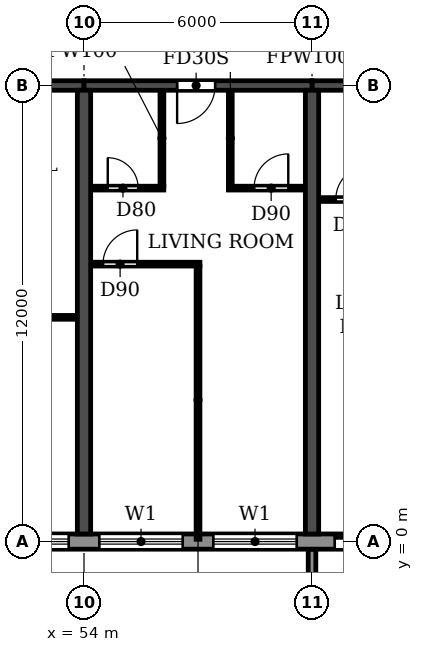
"""IFC4 building model, lengths in metres.
Left out: names, types, materials, properties, quantities, classifications, styles, units other than length and angle.
Written with IfcOpenShell. Run it as: python <this file> out.ifc"""

import sys

from ifc_helpers import new_model, si_unit, direction, frame, frame_2d, origin, place, context, subcontext, project, spatial, polyline, rectangle, outline, extrude, source, transform, mapped, element, fill, save


model = new_model("IFC4")
c1 = context("Model", 3, precision=1e-05, world=origin(), true_north=direction((0.0, 1.0)))
c2 = subcontext(c1, "Body", "Model", "MODEL_VIEW")
j1 = project(units=[si_unit("LENGTHUNIT", "METRE"), si_unit("PLANEANGLEUNIT", "RADIAN")], contexts=[c1])
p1 = place(None, origin())
s1 = spatial("IfcSite", under=j1, at=p1, CompositionType="ELEMENT")
p2 = place(p1, origin())
s2 = spatial("IfcBuilding", under=s1, at=p2, CompositionType="ELEMENT")
p3 = place(p2, frame((0.0, 0.0, 102.6)))
s3 = spatial("IfcBuildingStorey", under=s2, at=p3, CompositionType="ELEMENT", Elevation=102.6)
for number, where, z_axis, x_axis in (
    (1, (54.0, 0.2, 0.0), (0.0, 0.0, 1.0), (0.0, 1.0, 0.0)),
    (2, (60.0, 0.2, 0.0), (0.0, 0.0, 1.0), (0.0, 1.0, 0.0)),
):
    element("IfcWall", number, at=place(p3, frame(where, z_axis=z_axis, x_axis=x_axis)), inside=s3, PredefinedType="SHEAR", context=c2, shape_type="SweptSolid", body=[
        extrude(rectangle(XDim=11.675, YDim=0.35, at=frame_2d((5.837, 0.0))), origin(), (0.0, 0.0, 1.0), 3.0),
    ])
p4 = place(p3, frame((48.0, 12.0, 0.0), z_axis=(0.0, 0.0, 1.0), x_axis=(1.0, 0.0, 0.0)))
e3 = element("IfcWall", 3, at=p4, inside=s3, PredefinedType="SHEAR", context=c2, shape_type="SweptSolid", body=[
    extrude(rectangle(XDim=6.0, YDim=0.25, at=frame_2d((3.0, 0.0))), origin(), (0.0, 0.0, 1.0), 2.4),
])
p5 = place(p3, frame((54.0, 12.0, 0.0), z_axis=(0.0, 0.0, 1.0), x_axis=(1.0, 0.0, 0.0)))
e4 = element("IfcWall", 4, at=p5, inside=s3, PredefinedType="SHEAR", context=c2, shape_type="SweptSolid", body=[
    extrude(rectangle(XDim=6.0, YDim=0.25, at=frame_2d((3.0, 0.0))), origin(), (0.0, 0.0, 1.0), 2.4),
])
p6 = place(p5, frame((2.45, 0.0, 0.0)))
e5 = element("IfcOpeningElement", 5, at=p6, cuts=e4, PredefinedType="OPENING", context=c2, shape_type="SweptSolid", body=[
    extrude(rectangle(XDim=1.0, YDim=2.1, at=frame_2d((0.5, 1.05))), frame((0.0, 0.135, 0.0), z_axis=(0.0, -1.0, 0.0), x_axis=(1.0, 0.0, 0.0)), (0.0, 0.0, 1.0), 0.27),
])
p7 = place(p3, frame((60.0, 12.0, 0.0), z_axis=(0.0, 0.0, 1.0), x_axis=(1.0, 0.0, 0.0)))
e6 = element("IfcWall", 6, at=p7, inside=s3, PredefinedType="SHEAR", context=c2, shape_type="SweptSolid", body=[
    extrude(rectangle(XDim=6.0, YDim=0.25, at=frame_2d((3.0, 0.0))), origin(), (0.0, 0.0, 1.0), 2.4),
])
p8 = place(p7, frame((2.55, 0.0, 0.0)))
e7 = element("IfcOpeningElement", 7, at=p8, cuts=e6, PredefinedType="OPENING", context=c2, shape_type="SweptSolid", body=[
    extrude(rectangle(XDim=1.0, YDim=2.1, at=frame_2d((0.5, 1.05))), frame((0.0, 0.135, 0.0), z_axis=(0.0, -1.0, 0.0), x_axis=(1.0, 0.0, 0.0)), (0.0, 0.0, 1.0), 0.27),
])
p9 = place(p3, frame((10.683, 0.0, 0.0), z_axis=(0.0, 0.0, 1.0), x_axis=(1.0, 0.0, 0.0)))
e8 = element("IfcWall", 8, at=p9, inside=s3, PredefinedType="STANDARD", context=c2, shape_type="SweptSolid", body=[
    extrude(rectangle(XDim=80.634, YDim=0.4, at=frame_2d((40.317, 0.0))), origin(), (0.0, 0.0, 1.0), 3.0),
])
p10 = place(p9, frame((1.717, 0.0, 0.9)))
e9 = element("IfcOpeningElement", 9, at=p10, cuts=e8, PredefinedType="OPENING", context=c2, shape_type="SweptSolid", body=[
    extrude(rectangle(XDim=2.2, YDim=1.5, at=frame_2d((1.1, 0.75))), frame((0.0, 0.21, 0.0), z_axis=(0.0, -1.0, 0.0), x_axis=(1.0, 0.0, 0.0)), (0.0, 0.0, 1.0), 0.42),
])
p11 = place(p9, frame((4.917, 0.0, 0.0)))
e10 = element("IfcOpeningElement", 10, at=p11, cuts=e8, PredefinedType="OPENING", context=c2, shape_type="SweptSolid", body=[
    extrude(rectangle(XDim=1.8, YDim=2.4, at=frame_2d((0.9, 1.2))), frame((0.0, 0.21, 0.0), z_axis=(0.0, -1.0, 0.0), x_axis=(1.0, 0.0, 0.0)), (0.0, 0.0, 1.0), 0.42),
])
p12 = place(p9, frame((7.717, 0.0, 0.9)))
e11 = element("IfcOpeningElement", 11, at=p12, cuts=e8, PredefinedType="OPENING", context=c2, shape_type="SweptSolid", body=[
    extrude(rectangle(XDim=2.2, YDim=1.5, at=frame_2d((1.1, 0.75))), frame((0.0, 0.21, 0.0), z_axis=(0.0, -1.0, 0.0), x_axis=(1.0, 0.0, 0.0)), (0.0, 0.0, 1.0), 0.42),
])
p13 = place(p9, frame((10.717, 0.0, 0.9)))
e12 = element("IfcOpeningElement", 12, at=p13, cuts=e8, PredefinedType="OPENING", context=c2, shape_type="SweptSolid", body=[
    extrude(rectangle(XDim=2.2, YDim=1.5, at=frame_2d((1.1, 0.75))), frame((0.0, 0.21, 0.0), z_axis=(0.0, -1.0, 0.0), x_axis=(1.0, 0.0, 0.0)), (0.0, 0.0, 1.0), 0.42),
])
p14 = place(p9, frame((13.717, 0.0, 0.9)))
e13 = element("IfcOpeningElement", 13, at=p14, cuts=e8, PredefinedType="OPENING", context=c2, shape_type="SweptSolid", body=[
    extrude(rectangle(XDim=2.2, YDim=1.5, at=frame_2d((1.1, 0.75))), frame((0.0, 0.21, 0.0), z_axis=(0.0, -1.0, 0.0), x_axis=(1.0, 0.0, 0.0)), (0.0, 0.0, 1.0), 0.42),
])
p15 = place(p9, frame((16.717, 0.0, 0.9)))
e14 = element("IfcOpeningElement", 14, at=p15, cuts=e8, PredefinedType="OPENING", context=c2, shape_type="SweptSolid", body=[
    extrude(rectangle(XDim=2.2, YDim=1.5, at=frame_2d((1.1, 0.75))), frame((0.0, 0.21, 0.0), z_axis=(0.0, -1.0, 0.0), x_axis=(1.0, 0.0, 0.0)), (0.0, 0.0, 1.0), 0.42),
])
p16 = place(p9, frame((19.717, 0.0, 0.9)))
e15 = element("IfcOpeningElement", 15, at=p16, cuts=e8, PredefinedType="OPENING", context=c2, shape_type="SweptSolid", body=[
    extrude(rectangle(XDim=2.2, YDim=1.5, at=frame_2d((1.1, 0.75))), frame((0.0, 0.21, 0.0), z_axis=(0.0, -1.0, 0.0), x_axis=(1.0, 0.0, 0.0)), (0.0, 0.0, 1.0), 0.42),
])
p17 = place(p9, frame((22.717, 0.0, 0.9)))
e16 = element("IfcOpeningElement", 16, at=p17, cuts=e8, PredefinedType="OPENING", context=c2, shape_type="SweptSolid", body=[
    extrude(rectangle(XDim=2.2, YDim=1.5, at=frame_2d((1.1, 0.75))), frame((0.0, 0.21, 0.0), z_axis=(0.0, -1.0, 0.0), x_axis=(1.0, 0.0, 0.0)), (0.0, 0.0, 1.0), 0.42),
])
p18 = place(p9, frame((25.717, 0.0, 0.9)))
e17 = element("IfcOpeningElement", 17, at=p18, cuts=e8, PredefinedType="OPENING", context=c2, shape_type="SweptSolid", body=[
    extrude(rectangle(XDim=2.2, YDim=1.5, at=frame_2d((1.1, 0.75))), frame((0.0, 0.21, 0.0), z_axis=(0.0, -1.0, 0.0), x_axis=(1.0, 0.0, 0.0)), (0.0, 0.0, 1.0), 0.42),
])
p19 = place(p9, frame((28.917, 0.0, 0.0)))
e18 = element("IfcOpeningElement", 18, at=p19, cuts=e8, PredefinedType="OPENING", context=c2, shape_type="SweptSolid", body=[
    extrude(rectangle(XDim=1.8, YDim=2.4, at=frame_2d((0.9, 1.2))), frame((0.0, 0.21, 0.0), z_axis=(0.0, -1.0, 0.0), x_axis=(1.0, 0.0, 0.0)), (0.0, 0.0, 1.0), 0.42),
])
p20 = place(p9, frame((31.717, 0.0, 0.9)))
e19 = element("IfcOpeningElement", 19, at=p20, cuts=e8, PredefinedType="OPENING", context=c2, shape_type="SweptSolid", body=[
    extrude(rectangle(XDim=2.2, YDim=1.5, at=frame_2d((1.1, 0.75))), frame((0.0, 0.21, 0.0), z_axis=(0.0, -1.0, 0.0), x_axis=(1.0, 0.0, 0.0)), (0.0, 0.0, 1.0), 0.42),
])
p21 = place(p9, frame((34.717, 0.0, 0.9)))
e20 = element("IfcOpeningElement", 20, at=p21, cuts=e8, PredefinedType="OPENING", context=c2, shape_type="SweptSolid", body=[
    extrude(rectangle(XDim=2.2, YDim=1.5, at=frame_2d((1.1, 0.75))), frame((0.0, 0.21, 0.0), z_axis=(0.0, -1.0, 0.0), x_axis=(1.0, 0.0, 0.0)), (0.0, 0.0, 1.0), 0.42),
])
p22 = place(p9, frame((37.717, 0.0, 0.9)))
e21 = element("IfcOpeningElement", 21, at=p22, cuts=e8, PredefinedType="OPENING", context=c2, shape_type="SweptSolid", body=[
    extrude(rectangle(XDim=2.2, YDim=1.5, at=frame_2d((1.1, 0.75))), frame((0.0, 0.21, 0.0), z_axis=(0.0, -1.0, 0.0), x_axis=(1.0, 0.0, 0.0)), (0.0, 0.0, 1.0), 0.42),
])
p23 = place(p9, frame((40.717, 0.0, 0.9)))
e22 = element("IfcOpeningElement", 22, at=p23, cuts=e8, PredefinedType="OPENING", context=c2, shape_type="SweptSolid", body=[
    extrude(rectangle(XDim=2.2, YDim=1.5, at=frame_2d((1.1, 0.75))), frame((0.0, 0.21, 0.0), z_axis=(0.0, -1.0, 0.0), x_axis=(1.0, 0.0, 0.0)), (0.0, 0.0, 1.0), 0.42),
])
p24 = place(p9, frame((43.717, 0.0, 0.9)))
e23 = element("IfcOpeningElement", 23, at=p24, cuts=e8, PredefinedType="OPENING", context=c2, shape_type="SweptSolid", body=[
    extrude(rectangle(XDim=2.2, YDim=1.5, at=frame_2d((1.1, 0.75))), frame((0.0, 0.21, 0.0), z_axis=(0.0, -1.0, 0.0), x_axis=(1.0, 0.0, 0.0)), (0.0, 0.0, 1.0), 0.42),
])
p25 = place(p9, frame((46.717, 0.0, 0.9)))
e24 = element("IfcOpeningElement", 24, at=p25, cuts=e8, PredefinedType="OPENING", context=c2, shape_type="SweptSolid", body=[
    extrude(rectangle(XDim=2.2, YDim=1.5, at=frame_2d((1.1, 0.75))), frame((0.0, 0.21, 0.0), z_axis=(0.0, -1.0, 0.0), x_axis=(1.0, 0.0, 0.0)), (0.0, 0.0, 1.0), 0.42),
])
p26 = place(p9, frame((49.917, 0.0, 0.0)))
e25 = element("IfcOpeningElement", 25, at=p26, cuts=e8, PredefinedType="OPENING", context=c2, shape_type="SweptSolid", body=[
    extrude(rectangle(XDim=1.8, YDim=2.4, at=frame_2d((0.9, 1.2))), frame((0.0, 0.21, 0.0), z_axis=(0.0, -1.0, 0.0), x_axis=(1.0, 0.0, 0.0)), (0.0, 0.0, 1.0), 0.42),
])
p27 = place(p9, frame((52.717, 0.0, 0.9)))
e26 = element("IfcOpeningElement", 26, at=p27, cuts=e8, PredefinedType="OPENING", context=c2, shape_type="SweptSolid", body=[
    extrude(rectangle(XDim=2.2, YDim=1.5, at=frame_2d((1.1, 0.75))), frame((0.0, 0.21, 0.0), z_axis=(0.0, -1.0, 0.0), x_axis=(1.0, 0.0, 0.0)), (0.0, 0.0, 1.0), 0.42),
])
p28 = place(p9, frame((55.717, 0.0, 0.9)))
e27 = element("IfcOpeningElement", 27, at=p28, cuts=e8, PredefinedType="OPENING", context=c2, shape_type="SweptSolid", body=[
    extrude(rectangle(XDim=2.2, YDim=1.5, at=frame_2d((1.1, 0.75))), frame((0.0, 0.21, 0.0), z_axis=(0.0, -1.0, 0.0), x_axis=(1.0, 0.0, 0.0)), (0.0, 0.0, 1.0), 0.42),
])
p29 = place(p9, frame((58.717, 0.0, 0.9)))
e28 = element("IfcOpeningElement", 28, at=p29, cuts=e8, PredefinedType="OPENING", context=c2, shape_type="SweptSolid", body=[
    extrude(rectangle(XDim=2.2, YDim=1.5, at=frame_2d((1.1, 0.75))), frame((0.0, 0.21, 0.0), z_axis=(0.0, -1.0, 0.0), x_axis=(1.0, 0.0, 0.0)), (0.0, 0.0, 1.0), 0.42),
])
p30 = place(p9, frame((61.717, 0.0, 0.9)))
e29 = element("IfcOpeningElement", 29, at=p30, cuts=e8, PredefinedType="OPENING", context=c2, shape_type="SweptSolid", body=[
    extrude(rectangle(XDim=2.2, YDim=1.5, at=frame_2d((1.1, 0.75))), frame((0.0, 0.21, 0.0), z_axis=(0.0, -1.0, 0.0), x_axis=(1.0, 0.0, 0.0)), (0.0, 0.0, 1.0), 0.42),
])
p31 = place(p9, frame((64.717, 0.0, 0.9)))
e30 = element("IfcOpeningElement", 30, at=p31, cuts=e8, PredefinedType="OPENING", context=c2, shape_type="SweptSolid", body=[
    extrude(rectangle(XDim=2.2, YDim=1.5, at=frame_2d((1.1, 0.75))), frame((0.0, 0.21, 0.0), z_axis=(0.0, -1.0, 0.0), x_axis=(1.0, 0.0, 0.0)), (0.0, 0.0, 1.0), 0.42),
])
p32 = place(p9, frame((67.717, 0.0, 0.9)))
e31 = element("IfcOpeningElement", 31, at=p32, cuts=e8, PredefinedType="OPENING", context=c2, shape_type="SweptSolid", body=[
    extrude(rectangle(XDim=2.2, YDim=1.5, at=frame_2d((1.1, 0.75))), frame((0.0, 0.21, 0.0), z_axis=(0.0, -1.0, 0.0), x_axis=(1.0, 0.0, 0.0)), (0.0, 0.0, 1.0), 0.42),
])
p33 = place(p9, frame((70.717, 0.0, 0.9)))
e32 = element("IfcOpeningElement", 32, at=p33, cuts=e8, PredefinedType="OPENING", context=c2, shape_type="SweptSolid", body=[
    extrude(rectangle(XDim=2.2, YDim=1.5, at=frame_2d((1.1, 0.75))), frame((0.0, 0.21, 0.0), z_axis=(0.0, -1.0, 0.0), x_axis=(1.0, 0.0, 0.0)), (0.0, 0.0, 1.0), 0.42),
])
p34 = place(p9, frame((73.717, 0.0, 0.9)))
e33 = element("IfcOpeningElement", 33, at=p34, cuts=e8, PredefinedType="OPENING", context=c2, shape_type="SweptSolid", body=[
    extrude(rectangle(XDim=2.2, YDim=1.5, at=frame_2d((1.1, 0.75))), frame((0.0, 0.21, 0.0), z_axis=(0.0, -1.0, 0.0), x_axis=(1.0, 0.0, 0.0)), (0.0, 0.0, 1.0), 0.42),
])
p35 = place(p9, frame((76.917, 0.0, 0.0)))
e34 = element("IfcOpeningElement", 34, at=p35, cuts=e8, PredefinedType="OPENING", context=c2, shape_type="SweptSolid", body=[
    extrude(rectangle(XDim=1.8, YDim=2.4, at=frame_2d((0.9, 1.2))), frame((0.0, 0.21, 0.0), z_axis=(0.0, -1.0, 0.0), x_axis=(1.0, 0.0, 0.0)), (0.0, 0.0, 1.0), 0.42),
])
m1 = source(origin(), c2, "Body", "SweptSolid", [
    extrude(outline(polyline([(0.0, 0.0), (0.2, 0.0), (0.2, 1.65), (0.0, 1.65), (0.0, 0.0)])), origin(), (0.0, 0.0, 1.0), 3.1),
])
p36 = place(p3, frame((59.9, -1.85, 0.0)))
e35 = element("IfcWall", 35, at=p36, inside=s3, PredefinedType="STANDARD", context=c2, shape_type="MappedRepresentation", body=[
    mapped(m1, transform((0.0, 0.0, 0.0))),
])
p37 = place(p3, frame((48.185, 5.9, 0.0), z_axis=(0.0, 0.0, 1.0), x_axis=(1.0, 0.0, 0.0)))
e36 = element("IfcWall", 36, at=p37, inside=s3, PredefinedType="PARTITIONING", context=c2, shape_type="SweptSolid", body=[
    extrude(rectangle(XDim=5.63, YDim=0.1, at=frame_2d((2.815, 0.0))), origin(), (0.0, 0.0, 1.0), 3.0),
])
p38 = place(p37, frame((1.415, 0.0, 0.0)))
e37 = element("IfcOpeningElement", 37, at=p38, cuts=e36, PredefinedType="OPENING", context=c2, shape_type="SweptSolid", body=[
    extrude(rectangle(XDim=0.9, YDim=2.1, at=frame_2d((0.45, 1.05))), frame((0.0, 0.06, 0.0), z_axis=(0.0, -1.0, 0.0), x_axis=(1.0, 0.0, 0.0)), (0.0, 0.0, 1.0), 0.12),
])
p39 = place(p37, frame((3.315, 0.0, 0.0)))
e38 = element("IfcOpeningElement", 38, at=p39, cuts=e36, PredefinedType="OPENING", context=c2, shape_type="SweptSolid", body=[
    extrude(rectangle(XDim=0.9, YDim=2.1, at=frame_2d((0.45, 1.05))), frame((0.0, 0.06, 0.0), z_axis=(0.0, -1.0, 0.0), x_axis=(1.0, 0.0, 0.0)), (0.0, 0.0, 1.0), 0.12),
])
p40 = place(p3, frame((54.185, 7.3, 0.0), z_axis=(0.0, 0.0, 1.0), x_axis=(1.0, 0.0, 0.0)))
e39 = element("IfcWall", 39, at=p40, inside=s3, PredefinedType="PARTITIONING", context=c2, shape_type="SweptSolid", body=[
    extrude(rectangle(XDim=2.865, YDim=0.1, at=frame_2d((1.433, 0.0))), origin(), (0.0, 0.0, 1.0), 3.0),
])
p41 = place(p40, frame((0.315, 0.0, 0.0)))
e40 = element("IfcOpeningElement", 40, at=p41, cuts=e39, PredefinedType="OPENING", context=c2, shape_type="SweptSolid", body=[
    extrude(rectangle(XDim=0.9, YDim=2.1, at=frame_2d((0.45, 1.05))), frame((0.0, 0.06, 0.0), z_axis=(0.0, -1.0, 0.0), x_axis=(1.0, 0.0, 0.0)), (0.0, 0.0, 1.0), 0.12),
])
p42 = place(p3, frame((60.185, 9.0, 0.0), z_axis=(0.0, 0.0, 1.0), x_axis=(1.0, 0.0, 0.0)))
e41 = element("IfcWall", 41, at=p42, inside=s3, PredefinedType="PARTITIONING", context=c2, shape_type="SweptSolid", body=[
    extrude(rectangle(XDim=2.015, YDim=0.1, at=frame_2d((1.007, 0.0))), origin(), (0.0, 0.0, 1.0), 3.0),
])
p43 = place(p42, frame((0.44, 0.0, 0.0)))
e42 = element("IfcOpeningElement", 42, at=p43, cuts=e41, PredefinedType="OPENING", context=c2, shape_type="SweptSolid", body=[
    extrude(rectangle(XDim=0.9, YDim=2.1, at=frame_2d((0.45, 1.05))), frame((0.0, 0.06, 0.0), z_axis=(0.0, -1.0, 0.0), x_axis=(1.0, 0.0, 0.0)), (0.0, 0.0, 1.0), 0.12),
])
p44 = place(p3, frame((54.185, 9.3, 0.0), z_axis=(0.0, 0.0, 1.0), x_axis=(1.0, 0.0, 0.0)))
e43 = element("IfcWall", 43, at=p44, inside=s3, PredefinedType="PARTITIONING", context=c2, shape_type="SweptSolid", body=[
    extrude(rectangle(XDim=1.915, YDim=0.1, at=frame_2d((0.958, 0.0))), origin(), (0.0, 0.0, 1.0), 3.0),
])
p45 = place(p44, frame((0.44, 0.0, 0.0)))
e44 = element("IfcOpeningElement", 44, at=p45, cuts=e43, PredefinedType="OPENING", context=c2, shape_type="SweptSolid", body=[
    extrude(rectangle(XDim=0.8, YDim=2.1, at=frame_2d((0.4, 1.05))), frame((0.0, 0.06, 0.0), z_axis=(0.0, -1.0, 0.0), x_axis=(1.0, 0.0, 0.0)), (0.0, 0.0, 1.0), 0.12),
])
p46 = place(p3, frame((57.8, 9.3, 0.0), z_axis=(0.0, 0.0, 1.0), x_axis=(1.0, 0.0, 0.0)))
e45 = element("IfcWall", 45, at=p46, inside=s3, PredefinedType="PARTITIONING", context=c2, shape_type="SweptSolid", body=[
    extrude(rectangle(XDim=2.015, YDim=0.1, at=frame_2d((1.007, 0.0))), origin(), (0.0, 0.0, 1.0), 3.0),
])
p47 = place(p46, frame((0.675, 0.0, 0.0)))
e46 = element("IfcOpeningElement", 46, at=p47, cuts=e45, PredefinedType="OPENING", context=c2, shape_type="SweptSolid", body=[
    extrude(rectangle(XDim=0.9, YDim=2.1, at=frame_2d((0.45, 1.05))), frame((0.0, 0.06, 0.0), z_axis=(0.0, -1.0, 0.0), x_axis=(1.0, 0.0, 0.0)), (0.0, 0.0, 1.0), 0.12),
])
p48 = place(p3, frame((56.05, 9.35, 0.0), z_axis=(0.0, 0.0, 1.0), x_axis=(0.0, 1.0, 0.0)))
e47 = element("IfcWall", 47, at=p48, inside=s3, PredefinedType="PARTITIONING", context=c2, shape_type="SweptSolid", body=[
    extrude(rectangle(XDim=2.515, YDim=0.1, at=frame_2d((1.257, 0.0))), origin(), (0.0, 0.0, 1.0), 3.0),
])
p49 = place(p3, frame((57.0, 0.06, 0.0), z_axis=(0.0, 0.0, 1.0), x_axis=(0.0, 1.0, 0.0)))
e48 = element("IfcWall", 48, at=p49, inside=s3, PredefinedType="PARTITIONING", context=c2, shape_type="SweptSolid", body=[
    extrude(rectangle(XDim=7.19, YDim=0.1, at=frame_2d((3.595, 0.0))), origin(), (0.0, 0.0, 1.0), 3.0),
])
p50 = place(p3, frame((57.85, 9.35, 0.0), z_axis=(0.0, 0.0, 1.0), x_axis=(0.0, 1.0, 0.0)))
e49 = element("IfcWall", 49, at=p50, inside=s3, PredefinedType="PARTITIONING", context=c2, shape_type="SweptSolid", body=[
    extrude(rectangle(XDim=2.515, YDim=0.1, at=frame_2d((1.257, 0.0))), origin(), (0.0, 0.0, 1.0), 3.0),
])
p51 = place(p23, origin())
e50 = element("IfcWindow", 50, at=p51, inside=s3, PartitioningType="DOUBLE_PANEL_HORIZONTAL", PredefinedType="WINDOW", context=c2, shape_type="SweptSolid", body=[
    extrude(rectangle(XDim=2.2, YDim=1.5, at=frame_2d((1.1, 0.75))), frame((0.0, 0.03, 0.0), z_axis=(0.0, -1.0, 0.0), x_axis=(1.0, 0.0, 0.0)), (0.0, 0.0, 1.0), 0.06),
])
fill(e22, e50)
p52 = place(p24, origin())
e51 = element("IfcWindow", 51, at=p52, inside=s3, PartitioningType="DOUBLE_PANEL_HORIZONTAL", PredefinedType="WINDOW", context=c2, shape_type="SweptSolid", body=[
    extrude(rectangle(XDim=2.2, YDim=1.5, at=frame_2d((1.1, 0.75))), frame((0.0, 0.03, 0.0), z_axis=(0.0, -1.0, 0.0), x_axis=(1.0, 0.0, 0.0)), (0.0, 0.0, 1.0), 0.06),
])
fill(e23, e51)
p53 = place(p25, origin())
e52 = element("IfcWindow", 52, at=p53, inside=s3, PartitioningType="DOUBLE_PANEL_HORIZONTAL", PredefinedType="WINDOW", context=c2, shape_type="SweptSolid", body=[
    extrude(rectangle(XDim=2.2, YDim=1.5, at=frame_2d((1.1, 0.75))), frame((0.0, 0.03, 0.0), z_axis=(0.0, -1.0, 0.0), x_axis=(1.0, 0.0, 0.0)), (0.0, 0.0, 1.0), 0.06),
])
fill(e24, e52)
p54 = place(p26, origin())
e53 = element("IfcDoor", 53, at=p54, inside=s3, OperationType="DOUBLE_DOOR_SLIDING", PredefinedType="DOOR", context=c2, shape_type="SweptSolid", body=[
    extrude(rectangle(XDim=1.8, YDim=2.4, at=frame_2d((0.9, 1.2))), frame((0.0, 0.025, 0.0), z_axis=(0.0, -1.0, 0.0), x_axis=(1.0, 0.0, 0.0)), (0.0, 0.0, 1.0), 0.05),
])
fill(e25, e53)
p55 = place(p41, origin())
e54 = element("IfcDoor", 54, at=p55, inside=s3, OperationType="SINGLE_SWING_RIGHT", PredefinedType="DOOR", context=c2, shape_type="SweptSolid", body=[
    extrude(rectangle(XDim=0.9, YDim=2.1, at=frame_2d((0.45, 1.05))), frame((0.0, 0.025, 0.0), z_axis=(0.0, -1.0, 0.0), x_axis=(1.0, 0.0, 0.0)), (0.0, 0.0, 1.0), 0.05),
])
fill(e40, e54)
p56 = place(p45, origin())
e55 = element("IfcDoor", 55, at=p56, inside=s3, OperationType="SINGLE_SWING_LEFT", PredefinedType="DOOR", context=c2, shape_type="SweptSolid", body=[
    extrude(rectangle(XDim=0.8, YDim=2.1, at=frame_2d((0.4, 1.05))), frame((0.0, 0.025, 0.0), z_axis=(0.0, -1.0, 0.0), x_axis=(1.0, 0.0, 0.0)), (0.0, 0.0, 1.0), 0.05),
])
fill(e44, e55)
p57 = place(p6, frame((1.0, 0.0, 0.0), z_axis=(0.0, 0.0, 1.0), x_axis=(-1.0, 0.0, 0.0)))
e56 = element("IfcDoor", 56, at=p57, inside=s3, OperationType="SINGLE_SWING_RIGHT", PredefinedType="DOOR", context=c2, shape_type="SweptSolid", body=[
    extrude(rectangle(XDim=1.0, YDim=2.1, at=frame_2d((0.5, 1.05))), frame((0.0, 0.025, 0.0), z_axis=(0.0, -1.0, 0.0), x_axis=(1.0, 0.0, 0.0)), (0.0, 0.0, 1.0), 0.05),
])
fill(e5, e56)
p58 = place(p47, origin())
e57 = element("IfcDoor", 57, at=p58, inside=s3, OperationType="SINGLE_SWING_RIGHT", PredefinedType="DOOR", context=c2, shape_type="SweptSolid", body=[
    extrude(rectangle(XDim=0.9, YDim=2.1, at=frame_2d((0.45, 1.05))), frame((0.0, 0.025, 0.0), z_axis=(0.0, -1.0, 0.0), x_axis=(1.0, 0.0, 0.0)), (0.0, 0.0, 1.0), 0.05),
])
fill(e46, e57)
p59 = place(p43, origin())
e58 = element("IfcDoor", 58, at=p59, inside=s3, OperationType="SINGLE_SWING_RIGHT", PredefinedType="DOOR", context=c2, shape_type="SweptSolid", body=[
    extrude(rectangle(XDim=0.9, YDim=2.1, at=frame_2d((0.45, 1.05))), frame((0.0, 0.025, 0.0), z_axis=(0.0, -1.0, 0.0), x_axis=(1.0, 0.0, 0.0)), (0.0, 0.0, 1.0), 0.05),
])
fill(e42, e58)
save(model, sys.argv[1])
